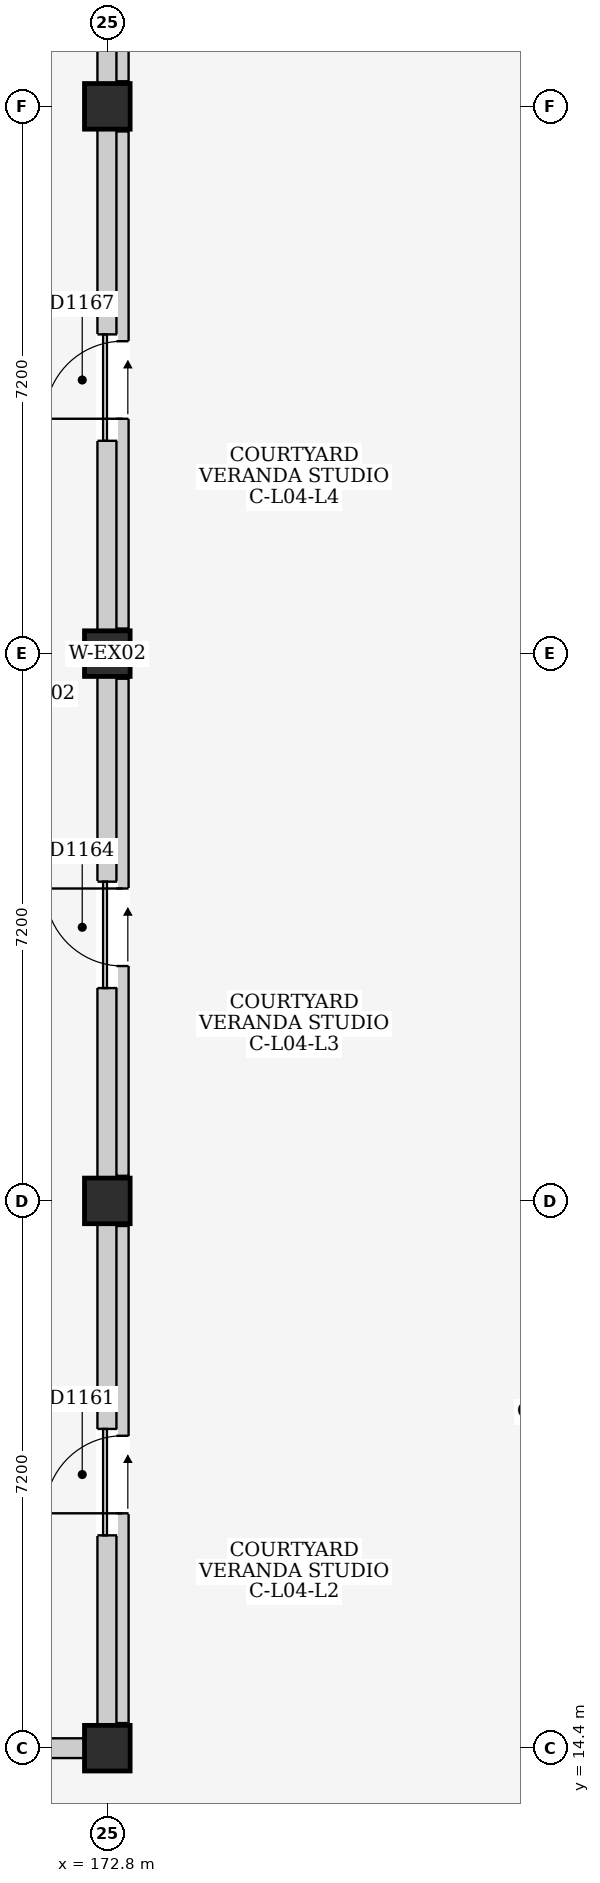
"""IFC4 building model, lengths in metres.
Left out: names, types, materials, properties, quantities, classifications, styles, units other than length and angle.
Written with IfcOpenShell. Run it as: python <this file> out.ifc"""

import sys

from ifc_helpers import new_model, si_unit, direction, frame, frame_2d, origin, origin_2d, place, context, subcontext, project, spatial, rectangle, extrude, element, fill, save


model = new_model("IFC4")
c1 = context("Model", 3, precision=1e-05, world=origin(), true_north=direction((0.0, 1.0)))
c2 = subcontext(c1, "Body", "Model", "MODEL_VIEW")
j1 = project(units=[si_unit("LENGTHUNIT", "METRE"), si_unit("PLANEANGLEUNIT", "RADIAN")], contexts=[c1])
p1 = place(None, origin())
s1 = spatial("IfcSite", under=j1, at=p1, CompositionType="ELEMENT")
p2 = place(p1, origin())
s2 = spatial("IfcBuilding", under=s1, at=p2, CompositionType="ELEMENT")
p3 = place(p2, frame((0.0, 0.0, 15.4)))
s3 = spatial("IfcBuildingStorey", under=s2, at=p3, CompositionType="ELEMENT", Elevation=15.4)
for number, where, z_axis, x_axis in (
    (1, (172.8, 14.4, 0.0), (0.0, 0.0, 1.0), (1.0, 0.0, 0.0)),
    (2, (172.8, 21.6, 0.0), (0.0, 0.0, 1.0), (1.0, 0.0, 0.0)),
    (3, (172.8, 28.8, 0.0), (0.0, 0.0, 1.0), (1.0, 0.0, 0.0)),
    (4, (172.8, 36.0, 0.0), (0.0, 0.0, 1.0), (1.0, 0.0, 0.0)),
):
    element("IfcColumn", number, at=place(p3, frame(where, z_axis=z_axis, x_axis=x_axis)), inside=s3, PredefinedType="COLUMN", context=c2, shape_type="SweptSolid", body=[
        extrude(rectangle(XDim=0.6, YDim=0.6, at=origin_2d()), origin(), (0.0, 0.0, 1.0), 3.2),
    ])
p4 = place(p3, frame((165.9, 14.4, 0.0), z_axis=(0.0, 0.0, 1.0), x_axis=(1.0, 0.0, 0.0)))
e5 = element("IfcWall", 5, at=p4, inside=s3, PredefinedType="ELEMENTEDWALL", context=c2, shape_type="SweptSolid", body=[
    extrude(rectangle(XDim=6.6, YDim=0.26, at=frame_2d((3.3, 0.0))), origin(), (0.0, 0.0, 1.0), 2.335),
])
p5 = place(p4, frame((2.8, 0.0, 1.2)))
e6 = element("IfcOpeningElement", 6, at=p5, cuts=e5, PredefinedType="OPENING", context=c2, shape_type="SweptSolid", body=[
    extrude(rectangle(XDim=1.0, YDim=0.9, at=frame_2d((0.5, 0.45))), frame((0.0, 0.145, 0.0), z_axis=(0.0, -1.0, 0.0), x_axis=(1.0, 0.0, 0.0)), (0.0, 0.0, 1.0), 0.29),
])
p6 = place(p3, frame((172.8, 14.7, 0.0), z_axis=(0.0, 0.0, 1.0), x_axis=(0.0, 1.0, 0.0)))
e7 = element("IfcWall", 7, at=p6, inside=s3, PredefinedType="ELEMENTEDWALL", context=c2, shape_type="SweptSolid", body=[
    extrude(rectangle(XDim=6.6, YDim=0.26, at=frame_2d((3.3, 0.0))), origin(), (0.0, 0.0, 1.0), 2.385),
])
p7 = place(p6, frame((2.5, 0.0, 0.0)))
e8 = element("IfcOpeningElement", 8, at=p7, cuts=e7, PredefinedType="OPENING", context=c2, shape_type="SweptSolid", body=[
    extrude(rectangle(XDim=1.4, YDim=2.1, at=frame_2d((0.7, 1.05))), frame((0.0, 0.145, 0.0), z_axis=(0.0, -1.0, 0.0), x_axis=(1.0, 0.0, 0.0)), (0.0, 0.0, 1.0), 0.29),
])
p8 = place(p3, frame((172.8, 21.9, 0.0), z_axis=(0.0, 0.0, 1.0), x_axis=(0.0, 1.0, 0.0)))
e9 = element("IfcWall", 9, at=p8, inside=s3, PredefinedType="ELEMENTEDWALL", context=c2, shape_type="SweptSolid", body=[
    extrude(rectangle(XDim=6.6, YDim=0.26, at=frame_2d((3.3, 0.0))), origin(), (0.0, 0.0, 1.0), 2.385),
])
p9 = place(p8, frame((2.5, 0.0, 0.0)))
e10 = element("IfcOpeningElement", 10, at=p9, cuts=e9, PredefinedType="OPENING", context=c2, shape_type="SweptSolid", body=[
    extrude(rectangle(XDim=1.4, YDim=2.1, at=frame_2d((0.7, 1.05))), frame((0.0, 0.145, 0.0), z_axis=(0.0, -1.0, 0.0), x_axis=(1.0, 0.0, 0.0)), (0.0, 0.0, 1.0), 0.29),
])
p10 = place(p3, frame((172.8, 29.1, 0.0), z_axis=(0.0, 0.0, 1.0), x_axis=(0.0, 1.0, 0.0)))
e11 = element("IfcWall", 11, at=p10, inside=s3, PredefinedType="ELEMENTEDWALL", context=c2, shape_type="SweptSolid", body=[
    extrude(rectangle(XDim=6.6, YDim=0.26, at=frame_2d((3.3, 0.0))), origin(), (0.0, 0.0, 1.0), 2.385),
])
p11 = place(p10, frame((2.5, 0.0, 0.0)))
e12 = element("IfcOpeningElement", 12, at=p11, cuts=e11, PredefinedType="OPENING", context=c2, shape_type="SweptSolid", body=[
    extrude(rectangle(XDim=1.4, YDim=2.1, at=frame_2d((0.7, 1.05))), frame((0.0, 0.145, 0.0), z_axis=(0.0, -1.0, 0.0), x_axis=(1.0, 0.0, 0.0)), (0.0, 0.0, 1.0), 0.29),
])
p12 = place(p3, frame((172.8, 36.3, 0.0), z_axis=(0.0, 0.0, 1.0), x_axis=(0.0, 1.0, 0.0)))
e13 = element("IfcWall", 13, at=p12, inside=s3, PredefinedType="ELEMENTEDWALL", context=c2, shape_type="SweptSolid", body=[
    extrude(rectangle(XDim=6.6, YDim=0.26, at=frame_2d((3.3, 0.0))), origin(), (0.0, 0.0, 1.0), 2.385),
])
p13 = place(p12, frame((2.5, 0.0, 0.0)))
e14 = element("IfcOpeningElement", 14, at=p13, cuts=e13, PredefinedType="OPENING", context=c2, shape_type="SweptSolid", body=[
    extrude(rectangle(XDim=1.4, YDim=2.1, at=frame_2d((0.7, 1.05))), frame((0.0, 0.145, 0.0), z_axis=(0.0, -1.0, 0.0), x_axis=(1.0, 0.0, 0.0)), (0.0, 0.0, 1.0), 0.29),
])
p14 = place(p3, frame((173.0, 14.73, 0.0), z_axis=(0.0, 0.0, 1.0), x_axis=(0.0, 1.0, 0.0)))
e15 = element("IfcWall", 15, at=p14, inside=s3, PredefinedType="PARTITIONING", context=c2, shape_type="SweptSolid", body=[
    extrude(rectangle(XDim=6.54, YDim=0.16, at=frame_2d((3.27, 0.0))), origin(), (0.0, 0.0, 1.0), 2.385),
])
p15 = place(p14, frame((2.76, 0.0, 0.0)))
e16 = element("IfcOpeningElement", 16, at=p15, cuts=e15, PredefinedType="OPENING", context=c2, shape_type="SweptSolid", body=[
    extrude(rectangle(XDim=1.02, YDim=2.18, at=frame_2d((0.51, 1.09))), frame((0.0, 0.095, 0.0), z_axis=(0.0, -1.0, 0.0), x_axis=(1.0, 0.0, 0.0)), (0.0, 0.0, 1.0), 0.19),
])
p16 = place(p3, frame((173.0, 21.93, 0.0), z_axis=(0.0, 0.0, 1.0), x_axis=(0.0, 1.0, 0.0)))
e17 = element("IfcWall", 17, at=p16, inside=s3, PredefinedType="PARTITIONING", context=c2, shape_type="SweptSolid", body=[
    extrude(rectangle(XDim=6.54, YDim=0.16, at=frame_2d((3.27, 0.0))), origin(), (0.0, 0.0, 1.0), 2.385),
])
p17 = place(p16, frame((2.76, 0.0, 0.0)))
e18 = element("IfcOpeningElement", 18, at=p17, cuts=e17, PredefinedType="OPENING", context=c2, shape_type="SweptSolid", body=[
    extrude(rectangle(XDim=1.02, YDim=2.18, at=frame_2d((0.51, 1.09))), frame((0.0, 0.095, 0.0), z_axis=(0.0, -1.0, 0.0), x_axis=(1.0, 0.0, 0.0)), (0.0, 0.0, 1.0), 0.19),
])
p18 = place(p3, frame((173.0, 29.13, 0.0), z_axis=(0.0, 0.0, 1.0), x_axis=(0.0, 1.0, 0.0)))
e19 = element("IfcWall", 19, at=p18, inside=s3, PredefinedType="PARTITIONING", context=c2, shape_type="SweptSolid", body=[
    extrude(rectangle(XDim=6.54, YDim=0.16, at=frame_2d((3.27, 0.0))), origin(), (0.0, 0.0, 1.0), 2.385),
])
p19 = place(p18, frame((2.76, 0.0, 0.0)))
e20 = element("IfcOpeningElement", 20, at=p19, cuts=e19, PredefinedType="OPENING", context=c2, shape_type="SweptSolid", body=[
    extrude(rectangle(XDim=1.02, YDim=2.18, at=frame_2d((0.51, 1.09))), frame((0.0, 0.095, 0.0), z_axis=(0.0, -1.0, 0.0), x_axis=(1.0, 0.0, 0.0)), (0.0, 0.0, 1.0), 0.19),
])
p20 = place(p3, frame((173.0, 36.33, 0.0), z_axis=(0.0, 0.0, 1.0), x_axis=(0.0, 1.0, 0.0)))
e21 = element("IfcWall", 21, at=p20, inside=s3, PredefinedType="PARTITIONING", context=c2, shape_type="SweptSolid", body=[
    extrude(rectangle(XDim=6.54, YDim=0.16, at=frame_2d((3.27, 0.0))), origin(), (0.0, 0.0, 1.0), 2.385),
])
p21 = place(p20, frame((2.76, 0.0, 0.0)))
e22 = element("IfcOpeningElement", 22, at=p21, cuts=e21, PredefinedType="OPENING", context=c2, shape_type="SweptSolid", body=[
    extrude(rectangle(XDim=1.02, YDim=2.18, at=frame_2d((0.51, 1.09))), frame((0.0, 0.095, 0.0), z_axis=(0.0, -1.0, 0.0), x_axis=(1.0, 0.0, 0.0)), (0.0, 0.0, 1.0), 0.19),
])
p22 = place(p7, frame((1.4, 0.0, 0.0), z_axis=(0.0, 0.0, 1.0), x_axis=(-1.0, 0.0, 0.0)))
e23 = element("IfcDoor", 23, at=p22, inside=s3, OperationType="SLIDING_TO_RIGHT", PredefinedType="DOOR", context=c2, shape_type="SweptSolid", body=[
    extrude(rectangle(XDim=1.4, YDim=2.1, at=frame_2d((0.7, 1.05))), frame((0.0, 0.025, 0.0), z_axis=(0.0, -1.0, 0.0), x_axis=(1.0, 0.0, 0.0)), (0.0, 0.0, 1.0), 0.05),
])
fill(e8, e23)
p23 = place(p9, frame((1.4, 0.0, 0.0), z_axis=(0.0, 0.0, 1.0), x_axis=(-1.0, 0.0, 0.0)))
e24 = element("IfcDoor", 24, at=p23, inside=s3, OperationType="SLIDING_TO_RIGHT", PredefinedType="DOOR", context=c2, shape_type="SweptSolid", body=[
    extrude(rectangle(XDim=1.4, YDim=2.1, at=frame_2d((0.7, 1.05))), frame((0.0, 0.025, 0.0), z_axis=(0.0, -1.0, 0.0), x_axis=(1.0, 0.0, 0.0)), (0.0, 0.0, 1.0), 0.05),
])
fill(e10, e24)
p24 = place(p11, frame((1.4, 0.0, 0.0), z_axis=(0.0, 0.0, 1.0), x_axis=(-1.0, 0.0, 0.0)))
e25 = element("IfcDoor", 25, at=p24, inside=s3, OperationType="SLIDING_TO_RIGHT", PredefinedType="DOOR", context=c2, shape_type="SweptSolid", body=[
    extrude(rectangle(XDim=1.4, YDim=2.1, at=frame_2d((0.7, 1.05))), frame((0.0, 0.025, 0.0), z_axis=(0.0, -1.0, 0.0), x_axis=(1.0, 0.0, 0.0)), (0.0, 0.0, 1.0), 0.05),
])
fill(e12, e25)
p25 = place(p15, origin())
e26 = element("IfcDoor", 26, at=p25, inside=s3, OperationType="SINGLE_SWING_LEFT", PredefinedType="DOOR", context=c2, shape_type="SweptSolid", body=[
    extrude(rectangle(XDim=1.02, YDim=2.18, at=frame_2d((0.51, 1.09))), frame((0.0, 0.025, 0.0), z_axis=(0.0, -1.0, 0.0), x_axis=(1.0, 0.0, 0.0)), (0.0, 0.0, 1.0), 0.05),
])
fill(e16, e26)
p26 = place(p17, origin())
e27 = element("IfcDoor", 27, at=p26, inside=s3, OperationType="SINGLE_SWING_RIGHT", PredefinedType="DOOR", context=c2, shape_type="SweptSolid", body=[
    extrude(rectangle(XDim=1.02, YDim=2.18, at=frame_2d((0.51, 1.09))), frame((0.0, 0.025, 0.0), z_axis=(0.0, -1.0, 0.0), x_axis=(1.0, 0.0, 0.0)), (0.0, 0.0, 1.0), 0.05),
])
fill(e18, e27)
p27 = place(p19, origin())
e28 = element("IfcDoor", 28, at=p27, inside=s3, OperationType="SINGLE_SWING_LEFT", PredefinedType="DOOR", context=c2, shape_type="SweptSolid", body=[
    extrude(rectangle(XDim=1.02, YDim=2.18, at=frame_2d((0.51, 1.09))), frame((0.0, 0.025, 0.0), z_axis=(0.0, -1.0, 0.0), x_axis=(1.0, 0.0, 0.0)), (0.0, 0.0, 1.0), 0.05),
])
fill(e20, e28)
save(model, sys.argv[1])
